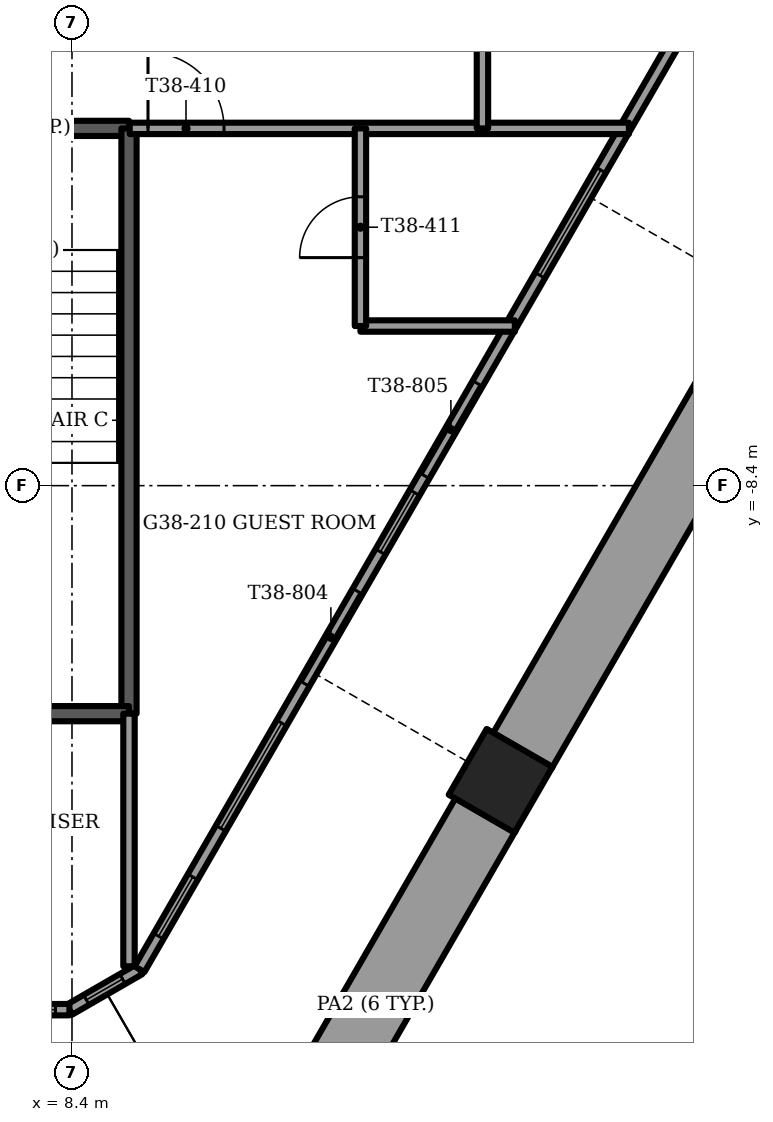
"""IFC4 building model, lengths in metres.
Left out: names, types, materials, properties, quantities, classifications, styles, units other than length and angle.
Written with IfcOpenShell. Run it as: python <this file> out.ifc"""

import sys

from ifc_helpers import new_model, si_unit, direction, frame, frame_2d, origin, origin_2d, place, context, subcontext, project, spatial, rectangle, extrude, element, fill, save


model = new_model("IFC4")
c1 = context("Model", 3, precision=1e-05, world=origin(), true_north=direction((0.0, 1.0)))
c2 = subcontext(c1, "Body", "Model", "MODEL_VIEW")
j1 = project(units=[si_unit("LENGTHUNIT", "METRE"), si_unit("PLANEANGLEUNIT", "RADIAN")], contexts=[c1])
p1 = place(None, origin())
s1 = spatial("IfcSite", under=j1, at=p1, CompositionType="ELEMENT")
p2 = place(p1, origin())
s2 = spatial("IfcBuilding", under=s1, at=p2, CompositionType="ELEMENT")
p3 = place(p2, frame((0.0, 0.0, 157.0)))
s3 = spatial("IfcBuildingStorey", under=s2, at=p3, CompositionType="ELEMENT", Elevation=157.0)
p4 = place(p3, frame((14.039, -12.283, -1.2), z_axis=(0.0, 0.0, 1.0), x_axis=(-0.5, -0.866025403784, 0.0)))
e1 = element("IfcColumn", 1, at=p4, inside=s3, PredefinedType="COLUMN", context=c2, shape_type="SweptSolid", body=[
    extrude(rectangle(XDim=1.0, YDim=1.0, at=origin_2d()), origin(), (0.0, 0.0, 1.0), 3.75),
])
p5 = place(p3, frame((10.941, -17.75, 0.0), z_axis=(0.0, 0.0, 1.0), x_axis=(0.499969679245, 0.866042908773, 0.0)))
e2 = element("IfcWall", 2, at=p5, inside=s3, PredefinedType="PARAPET", context=c2, shape_type="SweptSolid", body=[
    extrude(rectangle(XDim=5.813, YDim=0.9, at=frame_2d((2.906, 0.0))), origin(), (0.0, 0.0, 1.0), 1.1),
])
p6 = place(p3, frame((14.317, -11.901, 0.0), z_axis=(0.0, 0.0, 1.0), x_axis=(0.500013351051, 0.866017695414, 0.0)))
e3 = element("IfcWall", 3, at=p6, inside=s3, PredefinedType="PARAPET", context=c2, shape_type="SweptSolid", body=[
    extrude(rectangle(XDim=6.296, YDim=0.9, at=frame_2d((3.148, 0.0))), origin(), (0.0, 0.0, 1.0), 1.1),
])
p7 = place(p3, frame((-8.366, -15.294, 0.0), z_axis=(0.0, 0.0, 1.0), x_axis=(1.0, 0.0, 0.0)))
e4 = element("IfcWall", 4, at=p7, inside=s3, PredefinedType="SOLIDWALL", context=c2, shape_type="SweptSolid", body=[
    extrude(rectangle(XDim=16.732, YDim=0.15, at=frame_2d((8.366, 0.0))), origin(), (0.0, 0.0, 1.0), 3.45),
])
p8 = place(p7, frame((2.916, 0.0, 0.15)))
e5 = element("IfcOpeningElement", 5, at=p8, cuts=e4, PredefinedType="OPENING", context=c2, shape_type="SweptSolid", body=[
    extrude(rectangle(XDim=1.6, YDim=2.85, at=frame_2d((0.8, 1.425))), frame((0.0, 0.075, 0.0), z_axis=(0.0, -1.0, 0.0), x_axis=(1.0, 0.0, 0.0)), (0.0, 0.0, 1.0), 0.15),
])
p9 = place(p7, frame((4.566, 0.0, 0.0)))
e6 = element("IfcOpeningElement", 6, at=p9, cuts=e4, PredefinedType="OPENING", context=c2, shape_type="SweptSolid", body=[
    extrude(rectangle(XDim=1.4, YDim=2.4, at=frame_2d((0.7, 1.2))), frame((0.0, 0.075, 0.0), z_axis=(0.0, -1.0, 0.0), x_axis=(1.0, 0.0, 0.0)), (0.0, 0.0, 1.0), 0.15),
])
p10 = place(p7, frame((7.816, 0.0, 0.15)))
e7 = element("IfcOpeningElement", 7, at=p10, cuts=e4, PredefinedType="OPENING", context=c2, shape_type="SweptSolid", body=[
    extrude(rectangle(XDim=0.9, YDim=2.85, at=frame_2d((0.45, 1.425))), frame((0.0, 0.075, 0.0), z_axis=(0.0, -1.0, 0.0), x_axis=(1.0, 0.0, 0.0)), (0.0, 0.0, 1.0), 0.15),
])
p11 = place(p7, frame((10.766, 0.0, 0.15)))
e8 = element("IfcOpeningElement", 8, at=p11, cuts=e4, PredefinedType="OPENING", context=c2, shape_type="SweptSolid", body=[
    extrude(rectangle(XDim=0.9, YDim=2.85, at=frame_2d((0.45, 1.425))), frame((0.0, 0.075, 0.0), z_axis=(0.0, -1.0, 0.0), x_axis=(1.0, 0.0, 0.0)), (0.0, 0.0, 1.0), 0.15),
])
p12 = place(p7, frame((11.866, 0.0, 0.0)))
e9 = element("IfcOpeningElement", 9, at=p12, cuts=e4, PredefinedType="OPENING", context=c2, shape_type="SweptSolid", body=[
    extrude(rectangle(XDim=1.4, YDim=2.4, at=frame_2d((0.7, 1.2))), frame((0.0, 0.075, 0.0), z_axis=(0.0, -1.0, 0.0), x_axis=(1.0, 0.0, 0.0)), (0.0, 0.0, 1.0), 0.15),
])
p13 = place(p7, frame((0.183, 0.0, 0.15)))
e10 = element("IfcOpeningElement", 10, at=p13, cuts=e4, PredefinedType="OPENING", context=c2, shape_type="SweptSolid", body=[
    extrude(rectangle(XDim=1.6, YDim=2.73, at=frame_2d((0.8, 1.365))), frame((0.0, 0.075, 0.0), z_axis=(0.0, -1.0, 0.0), x_axis=(1.0, 0.0, 0.0)), (0.0, 0.0, 1.0), 0.15),
])
p14 = place(p7, frame((14.949, 0.0, 0.15)))
e11 = element("IfcOpeningElement", 11, at=p14, cuts=e4, PredefinedType="OPENING", context=c2, shape_type="SweptSolid", body=[
    extrude(rectangle(XDim=1.6, YDim=2.73, at=frame_2d((0.8, 1.365))), frame((0.0, 0.075, 0.0), z_axis=(0.0, -1.0, 0.0), x_axis=(1.0, 0.0, 0.0)), (0.0, 0.0, 1.0), 0.15),
])
p15 = place(p3, frame((9.289, -14.762, 0.0), z_axis=(0.0, 0.0, 1.0), x_axis=(0.499985985267, 0.866033495043, 0.0)))
e12 = element("IfcWall", 12, at=p15, inside=s3, PredefinedType="SOLIDWALL", context=c2, shape_type="SweptSolid", body=[
    extrude(rectangle(XDim=16.279, YDim=0.15, at=frame_2d((8.14, 0.0))), origin(), (0.0, 0.0, 1.0), 3.45),
])
p16 = place(p15, frame((2.14, 0.0, 0.15)))
e13 = element("IfcOpeningElement", 13, at=p16, cuts=e12, PredefinedType="OPENING", context=c2, shape_type="SweptSolid", body=[
    extrude(rectangle(XDim=1.6, YDim=2.85, at=frame_2d((0.8, 1.425))), frame((0.0, 0.075, 0.0), z_axis=(0.0, -1.0, 0.0), x_axis=(1.0, 0.0, 0.0)), (0.0, 0.0, 1.0), 0.15),
])
p17 = place(p15, frame((4.34, 0.0, 0.0)))
e14 = element("IfcOpeningElement", 14, at=p17, cuts=e12, PredefinedType="OPENING", context=c2, shape_type="SweptSolid", body=[
    extrude(rectangle(XDim=1.4, YDim=2.4, at=frame_2d((0.7, 1.2))), frame((0.0, 0.075, 0.0), z_axis=(0.0, -1.0, 0.0), x_axis=(1.0, 0.0, 0.0)), (0.0, 0.0, 1.0), 0.15),
])
p18 = place(p15, frame((6.34, 0.0, 0.15)))
e15 = element("IfcOpeningElement", 15, at=p18, cuts=e12, PredefinedType="OPENING", context=c2, shape_type="SweptSolid", body=[
    extrude(rectangle(XDim=0.9, YDim=2.85, at=frame_2d((0.45, 1.425))), frame((0.0, 0.075, 0.0), z_axis=(0.0, -1.0, 0.0), x_axis=(1.0, 0.0, 0.0)), (0.0, 0.0, 1.0), 0.15),
])
p19 = place(p15, frame((7.497, 0.0, 0.0)))
e16 = element("IfcOpeningElement", 16, at=p19, cuts=e12, PredefinedType="OPENING", context=c2, shape_type="SweptSolid", body=[
    extrude(rectangle(XDim=1.4, YDim=2.4, at=frame_2d((0.7, 1.2))), frame((0.0, 0.075, 0.0), z_axis=(0.0, -1.0, 0.0), x_axis=(1.0, 0.0, 0.0)), (0.0, 0.0, 1.0), 0.15),
])
p20 = place(p15, frame((10.54, 0.0, 0.15)))
e17 = element("IfcOpeningElement", 17, at=p20, cuts=e12, PredefinedType="OPENING", context=c2, shape_type="SweptSolid", body=[
    extrude(rectangle(XDim=1.6, YDim=2.85, at=frame_2d((0.8, 1.425))), frame((0.0, 0.075, 0.0), z_axis=(0.0, -1.0, 0.0), x_axis=(1.0, 0.0, 0.0)), (0.0, 0.0, 1.0), 0.15),
])
p21 = place(p15, frame((0.502, 0.0, 0.15)))
e18 = element("IfcOpeningElement", 18, at=p21, cuts=e12, PredefinedType="OPENING", context=c2, shape_type="SweptSolid", body=[
    extrude(rectangle(XDim=0.9, YDim=2.73, at=frame_2d((0.45, 1.365))), frame((0.0, 0.075, 0.0), z_axis=(0.0, -1.0, 0.0), x_axis=(1.0, 0.0, 0.0)), (0.0, 0.0, 1.0), 0.15),
])
p22 = place(p3, frame((8.366, -15.294, 0.0), z_axis=(0.0, 0.0, 1.0), x_axis=(0.866105447774, 0.499861334108, 0.0)))
e19 = element("IfcWall", 19, at=p22, inside=s3, PredefinedType="SOLIDWALL", context=c2, shape_type="SweptSolid", body=[
    extrude(rectangle(XDim=1.065, YDim=0.15, at=frame_2d((0.533, 0.0))), origin(), (0.0, 0.0, 1.0), 3.45),
])
p23 = place(p22, frame((0.258, 0.0, 0.15)))
e20 = element("IfcOpeningElement", 20, at=p23, cuts=e19, PredefinedType="OPENING", context=c2, shape_type="SweptSolid", body=[
    extrude(rectangle(XDim=0.55, YDim=2.85, at=frame_2d((0.275, 1.425))), frame((0.0, 0.075, 0.0), z_axis=(0.0, -1.0, 0.0), x_axis=(1.0, 0.0, 0.0)), (0.0, 0.0, 1.0), 0.15),
])
p24 = place(p3, frame((5.8, -3.7, -0.3), z_axis=(0.0, 0.0, 1.0), x_axis=(1.0, 0.0, 0.0)))
e21 = element("IfcWall", 21, at=p24, inside=s3, PredefinedType="SOLIDWALL", context=c2, shape_type="SweptSolid", body=[
    extrude(rectangle(XDim=3.35, YDim=0.2, at=frame_2d((1.675, 0.0))), origin(), (0.0, 0.0, 1.0), 3.75),
])
p25 = place(p24, frame((1.125, 0.0, 0.0)))
e22 = element("IfcOpeningElement", 22, at=p25, cuts=e21, PredefinedType="OPENING", context=c2, shape_type="SweptSolid", body=[
    extrude(rectangle(XDim=1.1, YDim=2.1, at=frame_2d((0.55, 1.05))), frame((0.0, 0.1, 0.0), z_axis=(0.0, -1.0, 0.0), x_axis=(1.0, 0.0, 0.0)), (0.0, 0.0, 1.0), 0.2),
])
p26 = place(p3, frame((9.15, -3.7, -0.3), z_axis=(0.0, 0.0, 1.0), x_axis=(0.0, -1.0, 0.0)))
e23 = element("IfcWall", 23, at=p26, inside=s3, PredefinedType="SOLIDWALL", context=c2, shape_type="SweptSolid", body=[
    extrude(rectangle(XDim=7.7, YDim=0.2, at=frame_2d((3.85, 0.0))), origin(), (0.0, 0.0, 1.0), 3.75),
])
p27 = place(p3, frame((5.8, -11.4, -0.3), z_axis=(0.0, 0.0, 1.0), x_axis=(1.0, 0.0, 0.0)))
e24 = element("IfcWall", 24, at=p27, inside=s3, PredefinedType="SOLIDWALL", context=c2, shape_type="SweptSolid", body=[
    extrude(rectangle(XDim=3.35, YDim=0.2, at=frame_2d((1.675, 0.0))), origin(), (0.0, 0.0, 1.0), 3.75),
])
p28 = place(p3, frame((9.15, -11.4, 0.0), z_axis=(0.0, 0.0, 1.0), x_axis=(0.0, -1.0, 0.0)))
e25 = element("IfcWall", 25, at=p28, inside=s3, PredefinedType="PARTITIONING", context=c2, shape_type="SweptSolid", body=[
    extrude(rectangle(XDim=3.323, YDim=0.15, at=frame_2d((1.662, 0.0))), origin(), (0.0, 0.0, 1.0), 3.45),
])
p29 = place(p3, frame((12.195, -6.3, 0.0), z_axis=(0.0, 0.0, 1.0), x_axis=(1.0, 0.0, 0.0)))
e26 = element("IfcWall", 26, at=p29, inside=s3, PredefinedType="PARTITIONING", context=c2, shape_type="SweptSolid", body=[
    extrude(rectangle(XDim=2.031, YDim=0.15, at=frame_2d((1.016, 0.0))), origin(), (0.0, 0.0, 1.0), 3.45),
])
p30 = place(p3, frame((9.16, -3.7, 0.0), z_axis=(0.0, 0.0, 1.0), x_axis=(1.0, 0.0, 0.0)))
e27 = element("IfcWall", 27, at=p30, inside=s3, PredefinedType="PARTITIONING", context=c2, shape_type="SweptSolid", body=[
    extrude(rectangle(XDim=6.567, YDim=0.15, at=frame_2d((3.284, 0.0))), origin(), (0.0, 0.0, 1.0), 3.45),
])
p31 = place(p30, frame((0.24, 0.0, 0.0)))
e28 = element("IfcOpeningElement", 28, at=p31, cuts=e27, PredefinedType="OPENING", context=c2, shape_type="SweptSolid", body=[
    extrude(rectangle(XDim=1.0, YDim=2.1, at=frame_2d((0.5, 1.05))), frame((0.0, 0.075, 0.0), z_axis=(0.0, -1.0, 0.0), x_axis=(1.0, 0.0, 0.0)), (0.0, 0.0, 1.0), 0.15),
])
p32 = place(p3, frame((13.8, -3.7, 0.0), z_axis=(0.0, 0.0, 1.0), x_axis=(0.0, 1.0, 0.0)))
e29 = element("IfcWall", 29, at=p32, inside=s3, PredefinedType="PARTITIONING", context=c2, shape_type="SweptSolid", body=[
    extrude(rectangle(XDim=2.0, YDim=0.15, at=frame_2d((1.0, 0.0))), origin(), (0.0, 0.0, 1.0), 3.45),
])
p33 = place(p3, frame((12.195, -6.3, 0.0), z_axis=(0.0, 0.0, 1.0), x_axis=(0.0, 1.0, 0.0)))
e30 = element("IfcWall", 30, at=p33, inside=s3, PredefinedType="PARTITIONING", context=c2, shape_type="SweptSolid", body=[
    extrude(rectangle(XDim=2.6, YDim=0.15, at=frame_2d((1.3, 0.0))), origin(), (0.0, 0.0, 1.0), 3.45),
])
p34 = place(p33, frame((0.9, 0.0, 0.0)))
e31 = element("IfcOpeningElement", 31, at=p34, cuts=e30, PredefinedType="OPENING", context=c2, shape_type="SweptSolid", body=[
    extrude(rectangle(XDim=0.8, YDim=2.1, at=frame_2d((0.4, 1.05))), frame((0.0, 0.075, 0.0), z_axis=(0.0, -1.0, 0.0), x_axis=(1.0, 0.0, 0.0)), (0.0, 0.0, 1.0), 0.15),
])
p35 = place(p14, origin())
e32 = element("IfcWindow", 32, at=p35, inside=s3, PartitioningType="SINGLE_PANEL", PredefinedType="WINDOW", context=c2, shape_type="SweptSolid", body=[
    extrude(rectangle(XDim=1.6, YDim=2.73, at=frame_2d((0.8, 1.365))), frame((0.0, 0.03, 0.0), z_axis=(0.0, -1.0, 0.0), x_axis=(1.0, 0.0, 0.0)), (0.0, 0.0, 1.0), 0.06),
])
fill(e11, e32)
p36 = place(p16, origin())
e33 = element("IfcWindow", 33, at=p36, inside=s3, PartitioningType="SINGLE_PANEL", PredefinedType="WINDOW", context=c2, shape_type="SweptSolid", body=[
    extrude(rectangle(XDim=1.6, YDim=2.85, at=frame_2d((0.8, 1.425))), frame((0.0, 0.03, 0.0), z_axis=(0.0, -1.0, 0.0), x_axis=(1.0, 0.0, 0.0)), (0.0, 0.0, 1.0), 0.06),
])
fill(e13, e33)
p37 = place(p17, origin())
e34 = element("IfcDoor", 34, at=p37, inside=s3, OperationType="SLIDING_TO_LEFT", PredefinedType="DOOR", context=c2, shape_type="SweptSolid", body=[
    extrude(rectangle(XDim=1.4, YDim=2.4, at=frame_2d((0.7, 1.2))), frame((0.0, 0.025, 0.0), z_axis=(0.0, -1.0, 0.0), x_axis=(1.0, 0.0, 0.0)), (0.0, 0.0, 1.0), 0.05),
])
fill(e14, e34)
p38 = place(p18, origin())
e35 = element("IfcWindow", 35, at=p38, inside=s3, PartitioningType="SINGLE_PANEL", PredefinedType="WINDOW", context=c2, shape_type="SweptSolid", body=[
    extrude(rectangle(XDim=0.9, YDim=2.85, at=frame_2d((0.45, 1.425))), frame((0.0, 0.03, 0.0), z_axis=(0.0, -1.0, 0.0), x_axis=(1.0, 0.0, 0.0)), (0.0, 0.0, 1.0), 0.06),
])
fill(e15, e35)
p39 = place(p19, origin())
e36 = element("IfcDoor", 36, at=p39, inside=s3, OperationType="SLIDING_TO_RIGHT", PredefinedType="DOOR", context=c2, shape_type="SweptSolid", body=[
    extrude(rectangle(XDim=1.4, YDim=2.4, at=frame_2d((0.7, 1.2))), frame((0.0, 0.025, 0.0), z_axis=(0.0, -1.0, 0.0), x_axis=(1.0, 0.0, 0.0)), (0.0, 0.0, 1.0), 0.05),
])
fill(e16, e36)
p40 = place(p20, origin())
e37 = element("IfcWindow", 37, at=p40, inside=s3, PartitioningType="SINGLE_PANEL", PredefinedType="WINDOW", context=c2, shape_type="SweptSolid", body=[
    extrude(rectangle(XDim=1.6, YDim=2.85, at=frame_2d((0.8, 1.425))), frame((0.0, 0.03, 0.0), z_axis=(0.0, -1.0, 0.0), x_axis=(1.0, 0.0, 0.0)), (0.0, 0.0, 1.0), 0.06),
])
fill(e17, e37)
p41 = place(p21, origin())
e38 = element("IfcWindow", 38, at=p41, inside=s3, PartitioningType="SINGLE_PANEL", PredefinedType="WINDOW", context=c2, shape_type="SweptSolid", body=[
    extrude(rectangle(XDim=0.9, YDim=2.73, at=frame_2d((0.45, 1.365))), frame((0.0, 0.03, 0.0), z_axis=(0.0, -1.0, 0.0), x_axis=(1.0, 0.0, 0.0)), (0.0, 0.0, 1.0), 0.06),
])
fill(e18, e38)
p42 = place(p23, origin())
e39 = element("IfcWindow", 39, at=p42, inside=s3, PartitioningType="SINGLE_PANEL", PredefinedType="WINDOW", context=c2, shape_type="SweptSolid", body=[
    extrude(rectangle(XDim=0.55, YDim=2.85, at=frame_2d((0.275, 1.425))), frame((0.0, 0.03, 0.0), z_axis=(0.0, -1.0, 0.0), x_axis=(1.0, 0.0, 0.0)), (0.0, 0.0, 1.0), 0.06),
])
fill(e20, e39)
p43 = place(p31, origin())
e40 = element("IfcDoor", 40, at=p43, inside=s3, OperationType="SINGLE_SWING_LEFT", PredefinedType="DOOR", context=c2, shape_type="SweptSolid", body=[
    extrude(rectangle(XDim=1.0, YDim=2.1, at=frame_2d((0.5, 1.05))), frame((0.0, 0.025, 0.0), z_axis=(0.0, -1.0, 0.0), x_axis=(1.0, 0.0, 0.0)), (0.0, 0.0, 1.0), 0.05),
])
fill(e28, e40)
p44 = place(p34, origin())
e41 = element("IfcDoor", 41, at=p44, inside=s3, OperationType="SINGLE_SWING_RIGHT", PredefinedType="DOOR", context=c2, shape_type="SweptSolid", body=[
    extrude(rectangle(XDim=0.8, YDim=2.1, at=frame_2d((0.4, 1.05))), frame((0.0, 0.025, 0.0), z_axis=(0.0, -1.0, 0.0), x_axis=(1.0, 0.0, 0.0)), (0.0, 0.0, 1.0), 0.05),
])
fill(e31, e41)
save(model, sys.argv[1])
